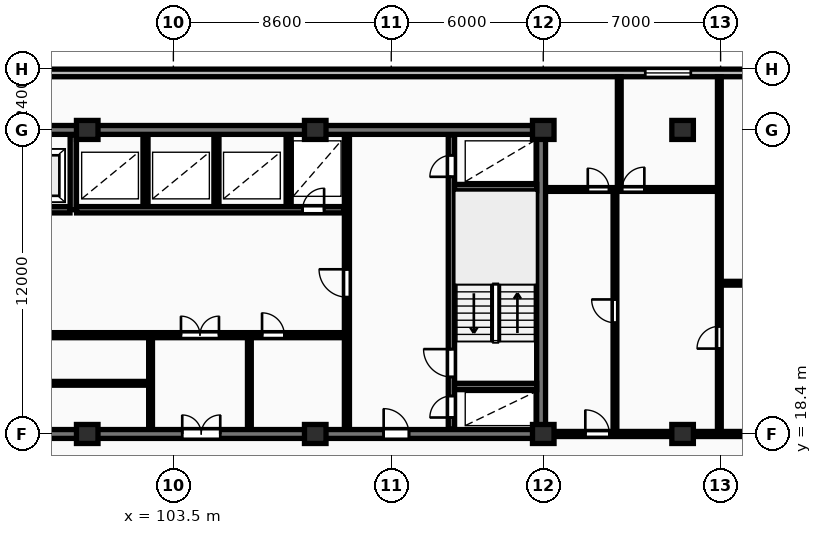
"""IFC4 building model, lengths in metres.
Left out: names, types, materials, properties, quantities, classifications, styles, units other than length and angle.
Written with IfcOpenShell. Run it as: python <this file> out.ifc"""

import sys

from ifc_helpers import new_model, si_unit, direction, frame, frame_2d, origin, origin_2d, place, context, subcontext, project, spatial, rectangle, extrude, element, fill, save


model = new_model("IFC4")
c1 = context("Model", 3, precision=1e-05, world=origin(), true_north=direction((0.0, 1.0)))
c2 = subcontext(c1, "Body", "Model", "MODEL_VIEW")
j1 = project(units=[si_unit("LENGTHUNIT", "METRE"), si_unit("PLANEANGLEUNIT", "RADIAN")], contexts=[c1])
p1 = place(None, origin())
s1 = spatial("IfcSite", under=j1, at=p1, CompositionType="ELEMENT")
p2 = place(p1, origin())
s2 = spatial("IfcBuilding", under=s1, at=p2, CompositionType="ELEMENT")
p3 = place(p2, frame((0.0, 0.0, 80.8)))
s3 = spatial("IfcBuildingStorey", under=s2, at=p3, CompositionType="ELEMENT", Elevation=80.8)
for number, where, z_axis, x_axis in (
    (1, (100.1, 18.4, 0.0), (0.0, 0.0, 1.0), (1.0, 0.0, 0.0)),
    (2, (100.1, 30.4, 0.0), (0.0, 0.0, 1.0), (1.0, 0.0, 0.0)),
    (3, (109.1, 18.4, 0.0), (0.0, 0.0, 1.0), (1.0, 0.0, 0.0)),
    (4, (109.1, 30.4, 0.0), (0.0, 0.0, 1.0), (1.0, 0.0, 0.0)),
    (5, (118.1, 18.4, 0.0), (0.0, 0.0, 1.0), (1.0, 0.0, 0.0)),
    (6, (118.1, 30.4, 0.0), (0.0, 0.0, 1.0), (1.0, 0.0, 0.0)),
    (7, (123.6, 18.4, 0.0), (0.0, 0.0, 1.0), (1.0, 0.0, 0.0)),
    (8, (123.6, 30.4, 0.0), (0.0, 0.0, 1.0), (1.0, 0.0, 0.0)),
):
    element("IfcColumn", number, at=place(p3, frame(where, z_axis=z_axis, x_axis=x_axis)), inside=s3, PredefinedType="COLUMN", context=c2, shape_type="SweptSolid", body=[
        extrude(rectangle(XDim=0.85, YDim=0.75, at=origin_2d()), origin(), (0.0, 0.0, 1.0), 3.25),
    ])
p4 = place(p3, frame((130.7, 32.65, 0.0), z_axis=(0.0, 0.0, 1.0), x_axis=(-1.0, 0.0, 0.0)))
e9 = element("IfcWall", 9, at=p4, inside=s3, PredefinedType="STANDARD", context=c2, shape_type="SweptSolid", body=[
    extrude(rectangle(XDim=58.0, YDim=0.3, at=frame_2d((29.0, 0.0))), origin(), (0.0, 0.0, 1.0), 2.97),
])
p5 = place(p4, frame((50.125, 0.0, 0.85)))
e10 = element("IfcOpeningElement", 10, at=p5, cuts=e9, PredefinedType="OPENING", context=c2, shape_type="SweptSolid", body=[
    extrude(rectangle(XDim=1.8, YDim=1.8, at=frame_2d((0.9, 0.9))), frame((0.0, 0.16, 0.0), z_axis=(0.0, -1.0, 0.0), x_axis=(1.0, 0.0, 0.0)), (0.0, 0.0, 1.0), 0.32),
])
p6 = place(p4, frame((6.775, 0.0, 0.85)))
e11 = element("IfcOpeningElement", 11, at=p6, cuts=e9, PredefinedType="OPENING", context=c2, shape_type="SweptSolid", body=[
    extrude(rectangle(XDim=1.8, YDim=1.8, at=frame_2d((0.9, 0.9))), frame((0.0, 0.16, 0.0), z_axis=(0.0, -1.0, 0.0), x_axis=(1.0, 0.0, 0.0)), (0.0, 0.0, 1.0), 0.32),
])
p7 = place(p3, frame((81.925, 30.4, 0.0), z_axis=(0.0, 0.0, 1.0), x_axis=(1.0, 0.0, 0.0)))
e12 = element("IfcWall", 12, at=p7, inside=s3, PredefinedType="SHEAR", context=c2, shape_type="SweptSolid", body=[
    extrude(rectangle(XDim=36.265, YDim=0.35, at=frame_2d((18.132, 0.0))), origin(), (0.0, 0.0, 1.0), 3.25),
])
p8 = place(p3, frame((118.015, 18.575, 0.0), z_axis=(0.0, 0.0, 1.0), x_axis=(0.0, 1.0, 0.0)))
e13 = element("IfcWall", 13, at=p8, inside=s3, PredefinedType="SHEAR", context=c2, shape_type="SweptSolid", body=[
    extrude(rectangle(XDim=11.65, YDim=0.35, at=frame_2d((5.825, 0.0))), origin(), (0.0, 0.0, 1.0), 3.25),
])
p9 = place(p3, frame((81.925, 18.4, 0.0), z_axis=(0.0, 0.0, 1.0), x_axis=(1.0, 0.0, 0.0)))
e14 = element("IfcWall", 14, at=p9, inside=s3, PredefinedType="SHEAR", context=c2, shape_type="SweptSolid", body=[
    extrude(rectangle(XDim=36.265, YDim=0.35, at=frame_2d((18.132, 0.0))), origin(), (0.0, 0.0, 1.0), 3.25),
])
p10 = place(p9, frame((5.675, 0.0, 0.0)))
e15 = element("IfcOpeningElement", 15, at=p10, cuts=e14, PredefinedType="OPENING", context=c2, shape_type="SweptSolid", body=[
    extrude(rectangle(XDim=1.0, YDim=2.15, at=frame_2d((0.5, 1.075))), frame((0.0, 0.185, 0.0), z_axis=(0.0, -1.0, 0.0), x_axis=(1.0, 0.0, 0.0)), (0.0, 0.0, 1.0), 0.37),
])
p11 = place(p9, frame((21.925, 0.0, 0.0)))
e16 = element("IfcOpeningElement", 16, at=p11, cuts=e14, PredefinedType="OPENING", context=c2, shape_type="SweptSolid", body=[
    extrude(rectangle(XDim=1.5, YDim=2.2, at=frame_2d((0.75, 1.1))), frame((0.0, 0.185, 0.0), z_axis=(0.0, -1.0, 0.0), x_axis=(1.0, 0.0, 0.0)), (0.0, 0.0, 1.0), 0.37),
])
p12 = place(p9, frame((29.875, 0.0, 0.0)))
e17 = element("IfcOpeningElement", 17, at=p12, cuts=e14, PredefinedType="OPENING", context=c2, shape_type="SweptSolid", body=[
    extrude(rectangle(XDim=1.0, YDim=2.15, at=frame_2d((0.5, 1.075))), frame((0.0, 0.185, 0.0), z_axis=(0.0, -1.0, 0.0), x_axis=(1.0, 0.0, 0.0)), (0.0, 0.0, 1.0), 0.37),
])
p13 = place(p3, frame((91.08, 27.25, 0.0), z_axis=(0.0, 0.0, 1.0), x_axis=(1.0, 0.0, 0.0)))
e18 = element("IfcWall", 18, at=p13, inside=s3, PredefinedType="SHEAR", context=c2, shape_type="SweptSolid", body=[
    extrude(rectangle(XDim=8.34, YDim=0.25, at=frame_2d((4.17, 0.0))), origin(), (0.0, 0.0, 1.0), 3.25),
])
p14 = place(p13, frame((0.76, 0.0, 0.0)))
e19 = element("IfcOpeningElement", 19, at=p14, cuts=e18, PredefinedType="OPENING", context=c2, shape_type="SweptSolid", body=[
    extrude(rectangle(XDim=1.12, YDim=2.12, at=frame_2d((0.56, 1.06))), frame((0.0, 0.135, 0.0), z_axis=(0.0, -1.0, 0.0), x_axis=(1.0, 0.0, 0.0)), (0.0, 0.0, 1.0), 0.27),
])
p15 = place(p13, frame((3.56, 0.0, 0.0)))
e20 = element("IfcOpeningElement", 20, at=p15, cuts=e18, PredefinedType="OPENING", context=c2, shape_type="SweptSolid", body=[
    extrude(rectangle(XDim=1.12, YDim=2.12, at=frame_2d((0.56, 1.06))), frame((0.0, 0.135, 0.0), z_axis=(0.0, -1.0, 0.0), x_axis=(1.0, 0.0, 0.0)), (0.0, 0.0, 1.0), 0.27),
])
p16 = place(p13, frame((6.36, 0.0, 0.0)))
e21 = element("IfcOpeningElement", 21, at=p16, cuts=e18, PredefinedType="OPENING", context=c2, shape_type="SweptSolid", body=[
    extrude(rectangle(XDim=1.12, YDim=2.12, at=frame_2d((0.56, 1.06))), frame((0.0, 0.135, 0.0), z_axis=(0.0, -1.0, 0.0), x_axis=(1.0, 0.0, 0.0)), (0.0, 0.0, 1.0), 0.27),
])
p17 = place(p3, frame((99.55, 27.25, 0.0), z_axis=(0.0, 0.0, 1.0), x_axis=(0.0, 1.0, 0.0)))
e22 = element("IfcWall", 22, at=p17, inside=s3, PredefinedType="SHEAR", context=c2, shape_type="SweptSolid", body=[
    extrude(rectangle(XDim=2.95, YDim=0.25, at=frame_2d((1.475, 0.0))), origin(), (0.0, 0.0, 1.0), 3.25),
])
for number, where, z_axis, x_axis in (
    (23, (102.4, 27.38, 0.0), (0.0, 0.0, 1.0), (0.0, 1.0, 0.0)),
    (24, (105.2, 27.38, 0.0), (0.0, 0.0, 1.0), (0.0, 1.0, 0.0)),
    (25, (108.05, 27.38, 0.0), (0.0, 0.0, 1.0), (0.0, 1.0, 0.0)),
):
    element("IfcWall", number, at=place(p3, frame(where, z_axis=z_axis, x_axis=x_axis)), inside=s3, PredefinedType="PARTITIONING", context=c2, shape_type="SweptSolid", body=[
        extrude(rectangle(XDim=2.82, YDim=0.2, at=frame_2d((1.41, 0.0))), origin(), (0.0, 0.0, 1.0), 2.97),
    ])
p18 = place(p3, frame((99.68, 27.25, 0.0), z_axis=(0.0, 0.0, 1.0), x_axis=(1.0, 0.0, 0.0)))
e26 = element("IfcWall", 26, at=p18, inside=s3, PredefinedType="SHEAR", context=c2, shape_type="SweptSolid", body=[
    extrude(rectangle(XDim=10.54, YDim=0.25, at=frame_2d((5.27, 0.0))), origin(), (0.0, 0.0, 1.0), 3.25),
])
p19 = place(p18, frame((8.92, 0.0, 0.0)))
e27 = element("IfcOpeningElement", 27, at=p19, cuts=e26, PredefinedType="OPENING", context=c2, shape_type="SweptSolid", body=[
    extrude(rectangle(XDim=0.85, YDim=2.05, at=frame_2d((0.425, 1.025))), frame((0.0, 0.135, 0.0), z_axis=(0.0, -1.0, 0.0), x_axis=(1.0, 0.0, 0.0)), (0.0, 0.0, 1.0), 0.27),
])
p20 = place(p3, frame((95.9, 20.4, 0.0), z_axis=(0.0, 0.0, 1.0), x_axis=(1.0, 0.0, 0.0)))
e28 = element("IfcWall", 28, at=p20, inside=s3, PredefinedType="PARTITIONING", context=c2, shape_type="SweptSolid", body=[
    extrude(rectangle(XDim=6.7, YDim=0.15, at=frame_2d((3.35, 0.0))), origin(), (0.0, 0.0, 1.0), 2.97),
])
p21 = place(p20, frame((1.6, 0.0, 0.0)))
e29 = element("IfcOpeningElement", 29, at=p21, cuts=e28, PredefinedType="OPENING", context=c2, shape_type="SweptSolid", body=[
    extrude(rectangle(XDim=0.88, YDim=2.06, at=frame_2d((0.44, 1.03))), frame((0.0, 0.085, 0.0), z_axis=(0.0, -1.0, 0.0), x_axis=(1.0, 0.0, 0.0)), (0.0, 0.0, 1.0), 0.17),
])
for number, where, z_axis, x_axis in (
    (30, (102.6, 18.6, 0.0), (0.0, 0.0, 1.0), (0.0, 1.0, 0.0)),
    (31, (106.5, 18.6, 0.0), (0.0, 0.0, 1.0), (0.0, 1.0, 0.0)),
):
    element("IfcWall", number, at=place(p3, frame(where, z_axis=z_axis, x_axis=x_axis)), inside=s3, PredefinedType="PARTITIONING", context=c2, shape_type="SweptSolid", body=[
        extrude(rectangle(XDim=3.6, YDim=0.15, at=frame_2d((1.8, 0.0))), origin(), (0.0, 0.0, 1.0), 2.97),
    ])
p22 = place(p3, frame((91.08, 22.3, 0.0), z_axis=(0.0, 0.0, 1.0), x_axis=(1.0, 0.0, 0.0)))
e32 = element("IfcWall", 32, at=p22, inside=s3, PredefinedType="PARTITIONING", context=c2, shape_type="SweptSolid", body=[
    extrude(rectangle(XDim=19.14, YDim=0.2, at=frame_2d((9.57, 0.0))), origin(), (0.0, 0.0, 1.0), 2.97),
])
p23 = place(p22, frame((1.15, 0.0, 0.0)))
e33 = element("IfcOpeningElement", 33, at=p23, cuts=e32, PredefinedType="OPENING", context=c2, shape_type="SweptSolid", body=[
    extrude(rectangle(XDim=0.85, YDim=2.05, at=frame_2d((0.425, 1.025))), frame((0.0, 0.11, 0.0), z_axis=(0.0, -1.0, 0.0), x_axis=(1.0, 0.0, 0.0)), (0.0, 0.0, 1.0), 0.22),
])
p24 = place(p22, frame((3.2, 0.0, 0.0)))
e34 = element("IfcOpeningElement", 34, at=p24, cuts=e32, PredefinedType="OPENING", context=c2, shape_type="SweptSolid", body=[
    extrude(rectangle(XDim=0.85, YDim=2.05, at=frame_2d((0.425, 1.025))), frame((0.0, 0.11, 0.0), z_axis=(0.0, -1.0, 0.0), x_axis=(1.0, 0.0, 0.0)), (0.0, 0.0, 1.0), 0.22),
])
p25 = place(p22, frame((12.72, 0.0, 0.0)))
e35 = element("IfcOpeningElement", 35, at=p25, cuts=e32, PredefinedType="OPENING", context=c2, shape_type="SweptSolid", body=[
    extrude(rectangle(XDim=1.5, YDim=2.2, at=frame_2d((0.75, 1.1))), frame((0.0, 0.11, 0.0), z_axis=(0.0, -1.0, 0.0), x_axis=(1.0, 0.0, 0.0)), (0.0, 0.0, 1.0), 0.22),
])
p26 = place(p22, frame((6.42, 0.0, 0.0)))
e36 = element("IfcOpeningElement", 36, at=p26, cuts=e32, PredefinedType="OPENING", context=c2, shape_type="SweptSolid", body=[
    extrude(rectangle(XDim=0.92, YDim=2.08, at=frame_2d((0.46, 1.04))), frame((0.0, 0.11, 0.0), z_axis=(0.0, -1.0, 0.0), x_axis=(1.0, 0.0, 0.0)), (0.0, 0.0, 1.0), 0.22),
])
p27 = place(p22, frame((15.92, 0.0, 0.0)))
e37 = element("IfcOpeningElement", 37, at=p27, cuts=e32, PredefinedType="OPENING", context=c2, shape_type="SweptSolid", body=[
    extrude(rectangle(XDim=0.88, YDim=2.06, at=frame_2d((0.44, 1.03))), frame((0.0, 0.11, 0.0), z_axis=(0.0, -1.0, 0.0), x_axis=(1.0, 0.0, 0.0)), (0.0, 0.0, 1.0), 0.22),
])
p28 = place(p3, frame((110.35, 18.6, 0.0), z_axis=(0.0, 0.0, 1.0), x_axis=(0.0, 1.0, 0.0)))
e38 = element("IfcWall", 38, at=p28, inside=s3, PredefinedType="PARTITIONING", context=c2, shape_type="SweptSolid", body=[
    extrude(rectangle(XDim=11.6, YDim=0.2, at=frame_2d((5.8, 0.0))), origin(), (0.0, 0.0, 1.0), 2.97),
])
p29 = place(p28, frame((5.2, 0.0, 0.0)))
e39 = element("IfcOpeningElement", 39, at=p29, cuts=e38, PredefinedType="OPENING", context=c2, shape_type="SweptSolid", body=[
    extrude(rectangle(XDim=1.1, YDim=2.15, at=frame_2d((0.55, 1.075))), frame((0.0, 0.11, 0.0), z_axis=(0.0, -1.0, 0.0), x_axis=(1.0, 0.0, 0.0)), (0.0, 0.0, 1.0), 0.22),
])
p30 = place(p3, frame((114.475, 18.6, 0.0), z_axis=(0.0, 0.0, 1.0), x_axis=(0.0, 1.0, 0.0)))
e40 = element("IfcWall", 40, at=p30, inside=s3, PredefinedType="SHEAR", context=c2, shape_type="SweptSolid", body=[
    extrude(rectangle(XDim=11.6, YDim=0.25, at=frame_2d((5.8, 0.0))), origin(), (0.0, 0.0, 1.0), 3.25),
])
p31 = place(p30, frame((0.45, 0.0, 0.0)))
e41 = element("IfcOpeningElement", 41, at=p31, cuts=e40, PredefinedType="OPENING", context=c2, shape_type="SweptSolid", body=[
    extrude(rectangle(XDim=0.85, YDim=2.05, at=frame_2d((0.425, 1.025))), frame((0.0, 0.135, 0.0), z_axis=(0.0, -1.0, 0.0), x_axis=(1.0, 0.0, 0.0)), (0.0, 0.0, 1.0), 0.27),
])
p32 = place(p30, frame((2.05, 0.0, 0.0)))
e42 = element("IfcOpeningElement", 42, at=p32, cuts=e40, PredefinedType="OPENING", context=c2, shape_type="SweptSolid", body=[
    extrude(rectangle(XDim=1.1, YDim=2.1, at=frame_2d((0.55, 1.05))), frame((0.0, 0.135, 0.0), z_axis=(0.0, -1.0, 0.0), x_axis=(1.0, 0.0, 0.0)), (0.0, 0.0, 1.0), 0.27),
])
p33 = place(p30, frame((9.95, 0.0, 0.0)))
e43 = element("IfcOpeningElement", 43, at=p33, cuts=e40, PredefinedType="OPENING", context=c2, shape_type="SweptSolid", body=[
    extrude(rectangle(XDim=0.85, YDim=2.05, at=frame_2d((0.425, 1.025))), frame((0.0, 0.135, 0.0), z_axis=(0.0, -1.0, 0.0), x_axis=(1.0, 0.0, 0.0)), (0.0, 0.0, 1.0), 0.27),
])
for number, where, z_axis, x_axis in (
    (44, (114.6, 20.275, 0.0), (0.0, 0.0, 1.0), (1.0, 0.0, 0.0)),
    (45, (114.6, 28.125, 0.0), (0.0, 0.0, 1.0), (1.0, 0.0, 0.0)),
):
    element("IfcWall", number, at=place(p3, frame(where, z_axis=z_axis, x_axis=x_axis)), inside=s3, PredefinedType="SHEAR", context=c2, shape_type="SweptSolid", body=[
        extrude(rectangle(XDim=3.24, YDim=0.25, at=frame_2d((1.62, 0.0))), origin(), (0.0, 0.0, 1.0), 3.25),
    ])
p34 = place(p3, frame((125.05, 24.35, 0.0), z_axis=(0.0, 0.0, 1.0), x_axis=(1.0, 0.0, 0.0)))
e46 = element("IfcWall", 46, at=p34, inside=s3, PredefinedType="PARTITIONING", context=c2, shape_type="SweptSolid", body=[
    extrude(rectangle(XDim=5.65, YDim=0.15, at=frame_2d((2.825, 0.0))), origin(), (0.0, 0.0, 1.0), 2.97),
])
p35 = place(p34, frame((2.405, 0.0, 0.0)))
e47 = element("IfcOpeningElement", 47, at=p35, cuts=e46, PredefinedType="OPENING", context=c2, shape_type="SweptSolid", body=[
    extrude(rectangle(XDim=0.84, YDim=2.04, at=frame_2d((0.42, 1.02))), frame((0.0, 0.085, 0.0), z_axis=(0.0, -1.0, 0.0), x_axis=(1.0, 0.0, 0.0)), (0.0, 0.0, 1.0), 0.17),
])
p36 = place(p3, frame((125.05, 18.45, 0.0), z_axis=(0.0, 0.0, 1.0), x_axis=(0.0, 1.0, 0.0)))
e48 = element("IfcWall", 48, at=p36, inside=s3, PredefinedType="PARTITIONING", context=c2, shape_type="SweptSolid", body=[
    extrude(rectangle(XDim=14.05, YDim=0.15, at=frame_2d((7.025, 0.0))), origin(), (0.0, 0.0, 1.0), 2.97),
])
p37 = place(p36, frame((3.32, 0.0, 0.0)))
e49 = element("IfcOpeningElement", 49, at=p37, cuts=e48, PredefinedType="OPENING", context=c2, shape_type="SweptSolid", body=[
    extrude(rectangle(XDim=0.88, YDim=2.06, at=frame_2d((0.44, 1.03))), frame((0.0, 0.085, 0.0), z_axis=(0.0, -1.0, 0.0), x_axis=(1.0, 0.0, 0.0)), (0.0, 0.0, 1.0), 0.17),
])
p38 = place(p3, frame((120.93, 18.45, 0.0), z_axis=(0.0, 0.0, 1.0), x_axis=(0.0, 1.0, 0.0)))
e50 = element("IfcWall", 50, at=p38, inside=s3, PredefinedType="PARTITIONING", context=c2, shape_type="SweptSolid", body=[
    extrude(rectangle(XDim=9.6, YDim=0.15, at=frame_2d((4.8, 0.0))), origin(), (0.0, 0.0, 1.0), 2.97),
])
p39 = place(p38, frame((4.34, 0.0, 0.0)))
e51 = element("IfcOpeningElement", 51, at=p39, cuts=e50, PredefinedType="OPENING", context=c2, shape_type="SweptSolid", body=[
    extrude(rectangle(XDim=0.92, YDim=2.08, at=frame_2d((0.46, 1.04))), frame((0.0, 0.085, 0.0), z_axis=(0.0, -1.0, 0.0), x_axis=(1.0, 0.0, 0.0)), (0.0, 0.0, 1.0), 0.17),
])
p40 = place(p3, frame((121.1, 28.05, 0.0), z_axis=(0.0, 0.0, 1.0), x_axis=(0.0, 1.0, 0.0)))
e52 = element("IfcWall", 52, at=p40, inside=s3, PredefinedType="PARTITIONING", context=c2, shape_type="SweptSolid", body=[
    extrude(rectangle(XDim=4.45, YDim=0.15, at=frame_2d((2.225, 0.0))), origin(), (0.0, 0.0, 1.0), 2.97),
])
p41 = place(p3, frame((118.27, 28.05, 0.0), z_axis=(0.0, 0.0, 1.0), x_axis=(1.0, 0.0, 0.0)))
e53 = element("IfcWall", 53, at=p41, inside=s3, PredefinedType="PARTITIONING", context=c2, shape_type="SweptSolid", body=[
    extrude(rectangle(XDim=6.76, YDim=0.15, at=frame_2d((3.38, 0.0))), origin(), (0.0, 0.0, 1.0), 2.97),
])
p42 = place(p41, frame((1.587, 0.0, 0.0)))
e54 = element("IfcOpeningElement", 54, at=p42, cuts=e53, PredefinedType="OPENING", context=c2, shape_type="SweptSolid", body=[
    extrude(rectangle(XDim=0.84, YDim=2.04, at=frame_2d((0.42, 1.02))), frame((0.0, 0.085, 0.0), z_axis=(0.0, -1.0, 0.0), x_axis=(1.0, 0.0, 0.0)), (0.0, 0.0, 1.0), 0.17),
])
p43 = place(p41, frame((2.94, 0.0, 0.0)))
e55 = element("IfcOpeningElement", 55, at=p43, cuts=e53, PredefinedType="OPENING", context=c2, shape_type="SweptSolid", body=[
    extrude(rectangle(XDim=0.88, YDim=2.06, at=frame_2d((0.44, 1.03))), frame((0.0, 0.085, 0.0), z_axis=(0.0, -1.0, 0.0), x_axis=(1.0, 0.0, 0.0)), (0.0, 0.0, 1.0), 0.17),
])
p44 = place(p3, frame((118.25, 18.4, 0.0), z_axis=(0.0, 0.0, 1.0), x_axis=(1.0, 0.0, 0.0)))
e56 = element("IfcWall", 56, at=p44, inside=s3, PredefinedType="PARTITIONING", context=c2, shape_type="SweptSolid", body=[
    extrude(rectangle(XDim=12.45, YDim=0.2, at=frame_2d((6.225, 0.0))), origin(), (0.0, 0.0, 1.0), 2.358),
])
p45 = place(p44, frame((1.51, 0.0, 0.0)))
e57 = element("IfcOpeningElement", 57, at=p45, cuts=e56, PredefinedType="OPENING", context=c2, shape_type="SweptSolid", body=[
    extrude(rectangle(XDim=0.95, YDim=2.15, at=frame_2d((0.475, 1.075))), frame((0.0, 0.11, 0.0), z_axis=(0.0, -1.0, 0.0), x_axis=(1.0, 0.0, 0.0)), (0.0, 0.0, 1.0), 0.22),
])
p46 = place(p6, origin())
e58 = element("IfcWindow", 58, at=p46, inside=s3, PartitioningType="SINGLE_PANEL", PredefinedType="WINDOW", context=c2, shape_type="SweptSolid", body=[
    extrude(rectangle(XDim=1.8, YDim=1.8, at=frame_2d((0.9, 0.9))), frame((0.0, 0.03, 0.0), z_axis=(0.0, -1.0, 0.0), x_axis=(1.0, 0.0, 0.0)), (0.0, 0.0, 1.0), 0.06),
])
fill(e11, e58)
p47 = place(p11, origin())
e59 = element("IfcDoor", 59, at=p47, inside=s3, OperationType="DOUBLE_DOOR_SINGLE_SWING", PredefinedType="DOOR", context=c2, shape_type="SweptSolid", body=[
    extrude(rectangle(XDim=1.5, YDim=2.2, at=frame_2d((0.75, 1.1))), frame((0.0, 0.025, 0.0), z_axis=(0.0, -1.0, 0.0), x_axis=(1.0, 0.0, 0.0)), (0.0, 0.0, 1.0), 0.05),
])
fill(e16, e59)
p48 = place(p12, origin())
e60 = element("IfcDoor", 60, at=p48, inside=s3, OperationType="SINGLE_SWING_LEFT", PredefinedType="DOOR", context=c2, shape_type="SweptSolid", body=[
    extrude(rectangle(XDim=1.0, YDim=2.15, at=frame_2d((0.5, 1.075))), frame((0.0, 0.025, 0.0), z_axis=(0.0, -1.0, 0.0), x_axis=(1.0, 0.0, 0.0)), (0.0, 0.0, 1.0), 0.05),
])
fill(e17, e60)
p49 = place(p19, origin())
e61 = element("IfcDoor", 61, at=p49, inside=s3, OperationType="SINGLE_SWING_RIGHT", PredefinedType="DOOR", context=c2, shape_type="SweptSolid", body=[
    extrude(rectangle(XDim=0.85, YDim=2.05, at=frame_2d((0.425, 1.025))), frame((0.0, 0.025, 0.0), z_axis=(0.0, -1.0, 0.0), x_axis=(1.0, 0.0, 0.0)), (0.0, 0.0, 1.0), 0.05),
])
fill(e27, e61)
p50 = place(p25, origin())
e62 = element("IfcDoor", 62, at=p50, inside=s3, OperationType="DOUBLE_DOOR_SINGLE_SWING", PredefinedType="DOOR", context=c2, shape_type="SweptSolid", body=[
    extrude(rectangle(XDim=1.5, YDim=2.2, at=frame_2d((0.75, 1.1))), frame((0.0, 0.025, 0.0), z_axis=(0.0, -1.0, 0.0), x_axis=(1.0, 0.0, 0.0)), (0.0, 0.0, 1.0), 0.05),
])
fill(e35, e62)
p51 = place(p27, origin())
e63 = element("IfcDoor", 63, at=p51, inside=s3, OperationType="SINGLE_SWING_LEFT", PredefinedType="DOOR", context=c2, shape_type="SweptSolid", body=[
    extrude(rectangle(XDim=0.88, YDim=2.06, at=frame_2d((0.44, 1.03))), frame((0.0, 0.025, 0.0), z_axis=(0.0, -1.0, 0.0), x_axis=(1.0, 0.0, 0.0)), (0.0, 0.0, 1.0), 0.05),
])
fill(e37, e63)
p52 = place(p29, origin())
e64 = element("IfcDoor", 64, at=p52, inside=s3, OperationType="SINGLE_SWING_RIGHT", PredefinedType="DOOR", context=c2, shape_type="SweptSolid", body=[
    extrude(rectangle(XDim=1.1, YDim=2.15, at=frame_2d((0.55, 1.075))), frame((0.0, 0.025, 0.0), z_axis=(0.0, -1.0, 0.0), x_axis=(1.0, 0.0, 0.0)), (0.0, 0.0, 1.0), 0.05),
])
fill(e39, e64)
p53 = place(p31, origin())
e65 = element("IfcDoor", 65, at=p53, inside=s3, OperationType="SINGLE_SWING_LEFT", PredefinedType="DOOR", context=c2, shape_type="SweptSolid", body=[
    extrude(rectangle(XDim=0.85, YDim=2.05, at=frame_2d((0.425, 1.025))), frame((0.0, 0.025, 0.0), z_axis=(0.0, -1.0, 0.0), x_axis=(1.0, 0.0, 0.0)), (0.0, 0.0, 1.0), 0.05),
])
fill(e41, e65)
p54 = place(p32, origin())
e66 = element("IfcDoor", 66, at=p54, inside=s3, OperationType="SINGLE_SWING_RIGHT", PredefinedType="DOOR", context=c2, shape_type="SweptSolid", body=[
    extrude(rectangle(XDim=1.1, YDim=2.1, at=frame_2d((0.55, 1.05))), frame((0.0, 0.025, 0.0), z_axis=(0.0, -1.0, 0.0), x_axis=(1.0, 0.0, 0.0)), (0.0, 0.0, 1.0), 0.05),
])
fill(e42, e66)
p55 = place(p33, origin())
e67 = element("IfcDoor", 67, at=p55, inside=s3, OperationType="SINGLE_SWING_LEFT", PredefinedType="DOOR", context=c2, shape_type="SweptSolid", body=[
    extrude(rectangle(XDim=0.85, YDim=2.05, at=frame_2d((0.425, 1.025))), frame((0.0, 0.025, 0.0), z_axis=(0.0, -1.0, 0.0), x_axis=(1.0, 0.0, 0.0)), (0.0, 0.0, 1.0), 0.05),
])
fill(e43, e67)
p56 = place(p37, origin())
e68 = element("IfcDoor", 68, at=p56, inside=s3, OperationType="SINGLE_SWING_LEFT", PredefinedType="DOOR", context=c2, shape_type="SweptSolid", body=[
    extrude(rectangle(XDim=0.88, YDim=2.06, at=frame_2d((0.44, 1.03))), frame((0.0, 0.025, 0.0), z_axis=(0.0, -1.0, 0.0), x_axis=(1.0, 0.0, 0.0)), (0.0, 0.0, 1.0), 0.05),
])
fill(e49, e68)
p57 = place(p39, origin())
e69 = element("IfcDoor", 69, at=p57, inside=s3, OperationType="SINGLE_SWING_RIGHT", PredefinedType="DOOR", context=c2, shape_type="SweptSolid", body=[
    extrude(rectangle(XDim=0.92, YDim=2.08, at=frame_2d((0.46, 1.04))), frame((0.0, 0.025, 0.0), z_axis=(0.0, -1.0, 0.0), x_axis=(1.0, 0.0, 0.0)), (0.0, 0.0, 1.0), 0.05),
])
fill(e51, e69)
p58 = place(p42, origin())
e70 = element("IfcDoor", 70, at=p58, inside=s3, OperationType="SINGLE_SWING_LEFT", PredefinedType="DOOR", context=c2, shape_type="SweptSolid", body=[
    extrude(rectangle(XDim=0.84, YDim=2.04, at=frame_2d((0.42, 1.02))), frame((0.0, 0.025, 0.0), z_axis=(0.0, -1.0, 0.0), x_axis=(1.0, 0.0, 0.0)), (0.0, 0.0, 1.0), 0.05),
])
fill(e54, e70)
p59 = place(p43, origin())
e71 = element("IfcDoor", 71, at=p59, inside=s3, OperationType="SINGLE_SWING_RIGHT", PredefinedType="DOOR", context=c2, shape_type="SweptSolid", body=[
    extrude(rectangle(XDim=0.88, YDim=2.06, at=frame_2d((0.44, 1.03))), frame((0.0, 0.025, 0.0), z_axis=(0.0, -1.0, 0.0), x_axis=(1.0, 0.0, 0.0)), (0.0, 0.0, 1.0), 0.05),
])
fill(e55, e71)
p60 = place(p45, origin())
e72 = element("IfcDoor", 72, at=p60, inside=s3, OperationType="SINGLE_SWING_LEFT", PredefinedType="DOOR", context=c2, shape_type="SweptSolid", body=[
    extrude(rectangle(XDim=0.95, YDim=2.15, at=frame_2d((0.475, 1.075))), frame((0.0, 0.025, 0.0), z_axis=(0.0, -1.0, 0.0), x_axis=(1.0, 0.0, 0.0)), (0.0, 0.0, 1.0), 0.05),
])
fill(e57, e72)
save(model, sys.argv[1])
